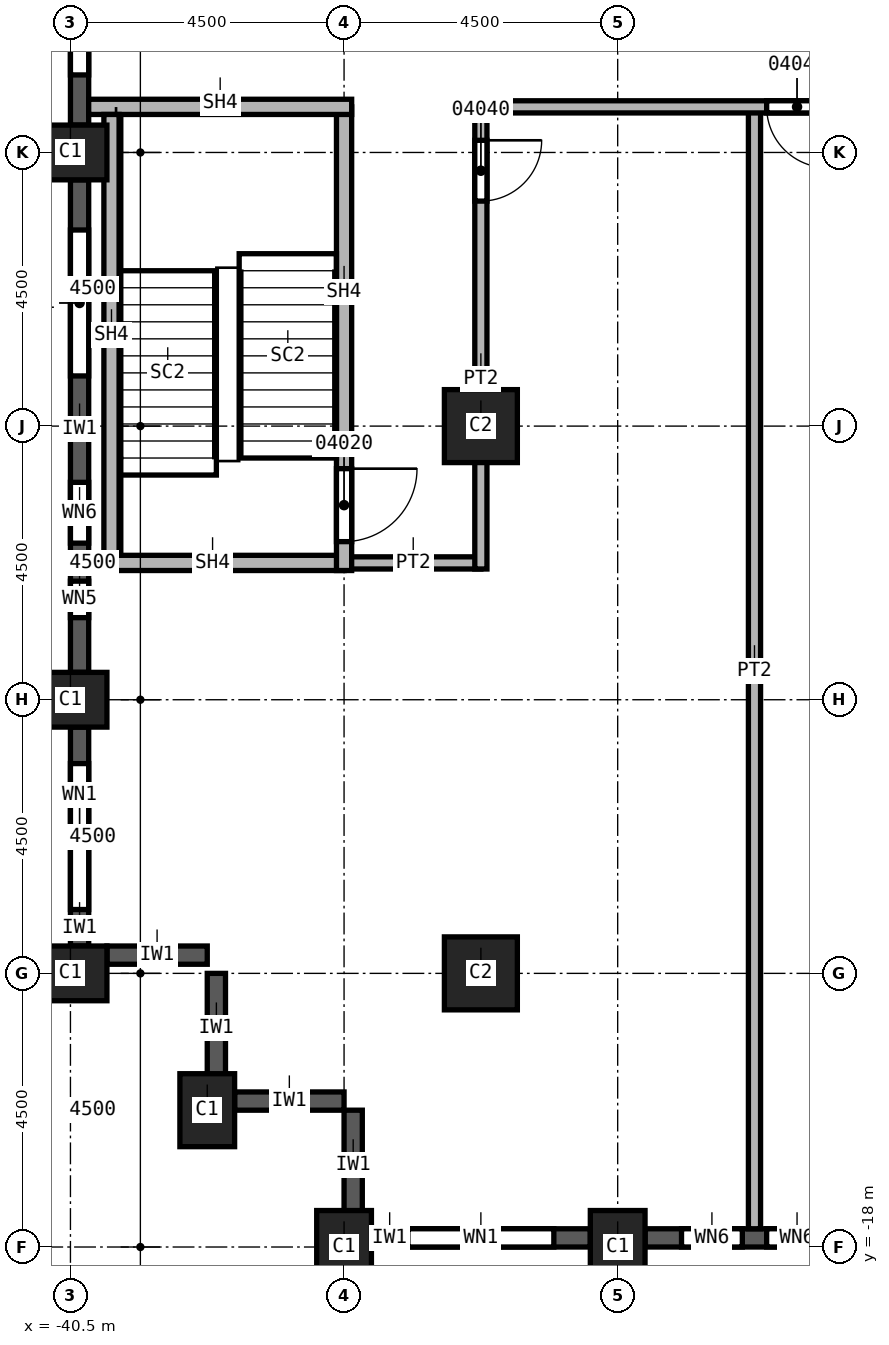
"""IFC4 building model, lengths in metres.
Left out: names, types, materials, properties, quantities, classifications, styles, units other than length and angle.
Written with IfcOpenShell. Run it as: python <this file> out.ifc"""

import sys

from ifc_helpers import new_model, si_unit, direction, frame, frame_2d, origin, origin_2d, place, context, subcontext, project, spatial, rectangle, extrude, element, fill, save


model = new_model("IFC4")
c1 = context("Model", 3, precision=1e-05, world=origin(), true_north=direction((0.0, 1.0)))
c2 = subcontext(c1, "Body", "Model", "MODEL_VIEW")
j1 = project(units=[si_unit("LENGTHUNIT", "METRE"), si_unit("PLANEANGLEUNIT", "RADIAN")], contexts=[c1])
p1 = place(None, origin())
s1 = spatial("IfcSite", under=j1, at=p1, CompositionType="ELEMENT")
p2 = place(p1, origin())
s2 = spatial("IfcBuilding", under=s1, at=p2, CompositionType="ELEMENT")
p3 = place(p2, frame((0.0, 0.0, 104.0)))
s3 = spatial("IfcBuildingStorey", under=s2, at=p3, CompositionType="ELEMENT", Elevation=104.0)
for number, where, z_axis, x_axis in (
    (1, (-40.5, 0.0, 0.0), (0.0, 0.0, 1.0), (0.0, 1.0, 0.0)),
    (2, (-40.5, -9.0, 0.0), (0.0, 0.0, 1.0), (0.0, 1.0, 0.0)),
    (3, (-40.5, -13.5, 0.0), (0.0, 0.0, 1.0), (0.0, 1.0, 0.0)),
    (4, (-38.25, -15.75, 0.0), (0.0, 0.0, 1.0), (1.0, 0.0, 0.0)),
    (5, (-31.5, -18.0, 0.0), (0.0, 0.0, 1.0), (1.0, 0.0, 0.0)),
    (6, (-36.0, -18.0, 0.0), (0.0, 0.0, 1.0), (1.0, 0.0, 0.0)),
):
    element("IfcColumn", number, at=place(p3, frame(where, z_axis=z_axis, x_axis=x_axis)), inside=s3, PredefinedType="COLUMN", context=c2, shape_type="SweptSolid", body=[
        extrude(rectangle(XDim=0.9, YDim=1.2, at=origin_2d()), origin(), (0.0, 0.0, 1.0), 3.7),
    ])
for number, where, z_axis, x_axis in (
    (7, (-33.75, -4.5, 0.0), (0.0, 0.0, 1.0), (1.0, 0.0, 0.0)),
    (8, (-33.75, -13.5, 0.0), (0.0, 0.0, 1.0), (1.0, 0.0, 0.0)),
):
    element("IfcColumn", number, at=place(p3, frame(where, z_axis=z_axis, x_axis=x_axis)), inside=s3, PredefinedType="COLUMN", context=c2, shape_type="SweptSolid", body=[
        extrude(rectangle(XDim=1.2, YDim=1.2, at=origin_2d()), origin(), (0.0, 0.0, 1.0), 3.7),
    ])
p4 = place(p3, frame((-39.9, -13.2, 0.0), z_axis=(0.0, 0.0, 1.0), x_axis=(1.0, 0.0, 0.0)))
e9 = element("IfcWall", 9, at=p4, inside=s3, PredefinedType="SOLIDWALL", context=c2, shape_type="SweptSolid", body=[
    extrude(rectangle(XDim=1.65, YDim=0.3, at=frame_2d((0.825, 0.0))), origin(), (0.0, 0.0, 1.0), 3.1),
])
for number, where, z_axis, x_axis in (
    (10, (-38.1, -15.3, 0.0), (0.0, 0.0, 1.0), (0.0, 1.0, 0.0)),
    (11, (-37.8, -15.6, 0.0), (0.0, 0.0, 1.0), (1.0, 0.0, 0.0)),
    (12, (-35.85, -17.55, 0.0), (0.0, 0.0, 1.0), (0.0, 1.0, 0.0)),
):
    element("IfcWall", number, at=place(p3, frame(where, z_axis=z_axis, x_axis=x_axis)), inside=s3, PredefinedType="SOLIDWALL", context=c2, shape_type="SweptSolid", body=[
        extrude(rectangle(XDim=1.8, YDim=0.3, at=frame_2d((0.9, 0.0))), origin(), (0.0, 0.0, 1.0), 3.1),
    ])
p5 = place(p3, frame((-40.35, 8.55, 0.0), z_axis=(0.0, 0.0, 1.0), x_axis=(0.0, -1.0, 0.0)))
e13 = element("IfcWall", 13, at=p5, inside=s3, PredefinedType="SOLIDWALL", context=c2, shape_type="SweptSolid", body=[
    extrude(rectangle(XDim=8.1, YDim=0.3, at=frame_2d((4.05, 0.0))), origin(), (0.0, 0.0, 1.0), 3.1),
])
p6 = place(p5, frame((0.825, 0.0, 0.8)))
e14 = element("IfcOpeningElement", 14, at=p6, cuts=e13, PredefinedType="OPENING", context=c2, shape_type="SweptSolid", body=[
    extrude(rectangle(XDim=2.4, YDim=1.95, at=frame_2d((1.2, 0.975))), frame((0.0, 0.15, 0.0), z_axis=(0.0, -1.0, 0.0), x_axis=(1.0, 0.0, 0.0)), (0.0, 0.0, 1.0), 0.3),
])
p7 = place(p5, frame((4.875, 0.0, 0.8)))
e15 = element("IfcOpeningElement", 15, at=p7, cuts=e13, PredefinedType="OPENING", context=c2, shape_type="SweptSolid", body=[
    extrude(rectangle(XDim=2.4, YDim=1.95, at=frame_2d((1.2, 0.975))), frame((0.0, 0.15, 0.0), z_axis=(0.0, -1.0, 0.0), x_axis=(1.0, 0.0, 0.0)), (0.0, 0.0, 1.0), 0.3),
])
p8 = place(p3, frame((-40.35, -0.45, 0.0), z_axis=(0.0, 0.0, 1.0), x_axis=(0.0, -1.0, 0.0)))
e16 = element("IfcWall", 16, at=p8, inside=s3, PredefinedType="SOLIDWALL", context=c2, shape_type="SweptSolid", body=[
    extrude(rectangle(XDim=8.1, YDim=0.3, at=frame_2d((4.05, 0.0))), origin(), (0.0, 0.0, 1.0), 3.1),
])
p9 = place(p8, frame((0.825, 0.0, 0.8)))
e17 = element("IfcOpeningElement", 17, at=p9, cuts=e16, PredefinedType="OPENING", context=c2, shape_type="SweptSolid", body=[
    extrude(rectangle(XDim=2.4, YDim=1.95, at=frame_2d((1.2, 0.975))), frame((0.0, 0.15, 0.0), z_axis=(0.0, -1.0, 0.0), x_axis=(1.0, 0.0, 0.0)), (0.0, 0.0, 1.0), 0.3),
])
p10 = place(p8, frame((4.975, 0.0, 0.8)))
e18 = element("IfcOpeningElement", 18, at=p10, cuts=e16, PredefinedType="OPENING", context=c2, shape_type="SweptSolid", body=[
    extrude(rectangle(XDim=1.0, YDim=1.95, at=frame_2d((0.5, 0.975))), frame((0.0, 0.15, 0.0), z_axis=(0.0, -1.0, 0.0), x_axis=(1.0, 0.0, 0.0)), (0.0, 0.0, 1.0), 0.3),
])
p11 = place(p8, frame((6.6, 0.0, 0.8)))
e19 = element("IfcOpeningElement", 19, at=p11, cuts=e16, PredefinedType="OPENING", context=c2, shape_type="SweptSolid", body=[
    extrude(rectangle(XDim=0.6, YDim=1.95, at=frame_2d((0.3, 0.975))), frame((0.0, 0.15, 0.0), z_axis=(0.0, -1.0, 0.0), x_axis=(1.0, 0.0, 0.0)), (0.0, 0.0, 1.0), 0.3),
])
p12 = place(p3, frame((-40.35, -9.45, 0.0), z_axis=(0.0, 0.0, 1.0), x_axis=(0.0, -1.0, 0.0)))
e20 = element("IfcWall", 20, at=p12, inside=s3, PredefinedType="SOLIDWALL", context=c2, shape_type="SweptSolid", body=[
    extrude(rectangle(XDim=3.6, YDim=0.3, at=frame_2d((1.8, 0.0))), origin(), (0.0, 0.0, 1.0), 3.1),
])
p13 = place(p12, frame((0.6, 0.0, 0.8)))
e21 = element("IfcOpeningElement", 21, at=p13, cuts=e20, PredefinedType="OPENING", context=c2, shape_type="SweptSolid", body=[
    extrude(rectangle(XDim=2.4, YDim=1.95, at=frame_2d((1.2, 0.975))), frame((0.0, 0.15, 0.0), z_axis=(0.0, -1.0, 0.0), x_axis=(1.0, 0.0, 0.0)), (0.0, 0.0, 1.0), 0.3),
])
p14 = place(p3, frame((-35.55, -17.85, 0.0), z_axis=(0.0, 0.0, 1.0), x_axis=(1.0, 0.0, 0.0)))
e22 = element("IfcWall", 22, at=p14, inside=s3, PredefinedType="SOLIDWALL", context=c2, shape_type="SweptSolid", body=[
    extrude(rectangle(XDim=3.6, YDim=0.3, at=frame_2d((1.8, 0.0))), origin(), (0.0, 0.0, 1.0), 3.1),
])
p15 = place(p14, frame((0.6, 0.0, 0.8)))
e23 = element("IfcOpeningElement", 23, at=p15, cuts=e22, PredefinedType="OPENING", context=c2, shape_type="SweptSolid", body=[
    extrude(rectangle(XDim=2.4, YDim=1.95, at=frame_2d((1.2, 0.975))), frame((0.0, 0.15, 0.0), z_axis=(0.0, -1.0, 0.0), x_axis=(1.0, 0.0, 0.0)), (0.0, 0.0, 1.0), 0.3),
])
p16 = place(p3, frame((-31.05, -17.85, 0.0), z_axis=(0.0, 0.0, 1.0), x_axis=(1.0, 0.0, 0.0)))
e24 = element("IfcWall", 24, at=p16, inside=s3, PredefinedType="SOLIDWALL", context=c2, shape_type="SweptSolid", body=[
    extrude(rectangle(XDim=3.6, YDim=0.3, at=frame_2d((1.8, 0.0))), origin(), (0.0, 0.0, 1.0), 3.1),
])
p17 = place(p16, frame((0.6, 0.0, 0.8)))
e25 = element("IfcOpeningElement", 25, at=p17, cuts=e24, PredefinedType="OPENING", context=c2, shape_type="SweptSolid", body=[
    extrude(rectangle(XDim=1.0, YDim=1.95, at=frame_2d((0.5, 0.975))), frame((0.0, 0.15, 0.0), z_axis=(0.0, -1.0, 0.0), x_axis=(1.0, 0.0, 0.0)), (0.0, 0.0, 1.0), 0.3),
])
p18 = place(p16, frame((2.0, 0.0, 0.8)))
e26 = element("IfcOpeningElement", 26, at=p18, cuts=e24, PredefinedType="OPENING", context=c2, shape_type="SweptSolid", body=[
    extrude(rectangle(XDim=1.0, YDim=1.95, at=frame_2d((0.5, 0.975))), frame((0.0, 0.15, 0.0), z_axis=(0.0, -1.0, 0.0), x_axis=(1.0, 0.0, 0.0)), (0.0, 0.0, 1.0), 0.3),
])
p19 = place(p3, frame((-33.75, -6.75, 0.0), z_axis=(0.0, 0.0, 1.0), x_axis=(-1.0, 0.0, 0.0)))
e27 = element("IfcWall", 27, at=p19, inside=s3, PredefinedType="PARTITIONING", context=c2, shape_type="SweptSolid", body=[
    extrude(rectangle(XDim=2.25, YDim=0.2, at=frame_2d((1.125, 0.0))), origin(), (0.0, 0.0, 1.0), 3.7),
])
p20 = place(p3, frame((-33.75, 0.75, 0.0), z_axis=(0.0, 0.0, 1.0), x_axis=(0.0, -1.0, 0.0)))
e28 = element("IfcWall", 28, at=p20, inside=s3, PredefinedType="PARTITIONING", context=c2, shape_type="SweptSolid", body=[
    extrude(rectangle(XDim=7.6, YDim=0.2, at=frame_2d((3.8, 0.0))), origin(), (0.0, 0.0, 1.0), 3.7),
])
p21 = place(p20, frame((0.55, 0.0, 0.0)))
e29 = element("IfcOpeningElement", 29, at=p21, cuts=e28, PredefinedType="OPENING", context=c2, shape_type="SweptSolid", body=[
    extrude(rectangle(XDim=1.0, YDim=2.1, at=frame_2d((0.5, 1.05))), frame((0.0, 0.1, 0.0), z_axis=(0.0, -1.0, 0.0), x_axis=(1.0, 0.0, 0.0)), (0.0, 0.0, 1.0), 0.2),
])
p22 = place(p3, frame((-29.25, 0.75, 0.0), z_axis=(0.0, 0.0, 1.0), x_axis=(0.0, -1.0, 0.0)))
e30 = element("IfcWall", 30, at=p22, inside=s3, PredefinedType="PARTITIONING", context=c2, shape_type="SweptSolid", body=[
    extrude(rectangle(XDim=18.45, YDim=0.2, at=frame_2d((9.225, 0.0))), origin(), (0.0, 0.0, 1.0), 3.7),
])
p23 = place(p3, frame((-15.4, 0.75, 0.0), z_axis=(0.0, 0.0, 1.0), x_axis=(-1.0, 0.0, 0.0)))
e31 = element("IfcWall", 31, at=p23, inside=s3, PredefinedType="PARTITIONING", context=c2, shape_type="SweptSolid", body=[
    extrude(rectangle(XDim=18.45, YDim=0.2, at=frame_2d((9.225, 0.0))), origin(), (0.0, 0.0, 1.0), 3.7),
])
p24 = place(p23, frame((12.65, 0.0, 0.0)))
e32 = element("IfcOpeningElement", 32, at=p24, cuts=e31, PredefinedType="OPENING", context=c2, shape_type="SweptSolid", body=[
    extrude(rectangle(XDim=1.0, YDim=2.1, at=frame_2d((0.5, 1.05))), frame((0.0, 0.1, 0.0), z_axis=(0.0, -1.0, 0.0), x_axis=(1.0, 0.0, 0.0)), (0.0, 0.0, 1.0), 0.2),
])
p25 = place(p3, frame((-36.0, -6.75, 0.0), z_axis=(0.0, 0.0, 1.0), x_axis=(-1.0, 0.0, 0.0)))
e33 = element("IfcWall", 33, at=p25, inside=s3, PredefinedType="SOLIDWALL", context=c2, shape_type="SweptSolid", body=[
    extrude(rectangle(XDim=4.2, YDim=0.25, at=frame_2d((2.1, 0.0))), origin(), (0.0, 0.0, 1.0), 3.7),
])
p26 = place(p3, frame((-36.0, 0.75, 0.0), z_axis=(0.0, 0.0, 1.0), x_axis=(0.0, -1.0, 0.0)))
e34 = element("IfcWall", 34, at=p26, inside=s3, PredefinedType="SOLIDWALL", context=c2, shape_type="SweptSolid", body=[
    extrude(rectangle(XDim=7.625, YDim=0.25, at=frame_2d((3.812, 0.0))), origin(), (0.0, 0.0, 1.0), 3.7),
])
p27 = place(p26, frame((5.95, 0.0, 0.0)))
e35 = element("IfcOpeningElement", 35, at=p27, cuts=e34, PredefinedType="OPENING", context=c2, shape_type="SweptSolid", body=[
    extrude(rectangle(XDim=1.2, YDim=2.1, at=frame_2d((0.6, 1.05))), frame((0.0, 0.125, 0.0), z_axis=(0.0, -1.0, 0.0), x_axis=(1.0, 0.0, 0.0)), (0.0, 0.0, 1.0), 0.25),
])
p28 = place(p3, frame((-35.875, 0.75, 0.0), z_axis=(0.0, 0.0, 1.0), x_axis=(-1.0, 0.0, 0.0)))
e36 = element("IfcWall", 36, at=p28, inside=s3, PredefinedType="SOLIDWALL", context=c2, shape_type="SweptSolid", body=[
    extrude(rectangle(XDim=4.325, YDim=0.25, at=frame_2d((2.163, 0.0))), origin(), (0.0, 0.0, 1.0), 3.7),
])
p29 = place(p3, frame((-39.825, -6.625, 0.0), z_axis=(0.0, 0.0, 1.0), x_axis=(0.0, 1.0, 0.0)))
e37 = element("IfcWall", 37, at=p29, inside=s3, PredefinedType="SOLIDWALL", context=c2, shape_type="SweptSolid", body=[
    extrude(rectangle(XDim=7.25, YDim=0.25, at=frame_2d((3.625, 0.0))), origin(), (0.0, 0.0, 1.0), 3.7),
])
p30 = place(p7, origin())
e38 = element("IfcWindow", 38, at=p30, inside=s3, PartitioningType="SINGLE_PANEL", PredefinedType="WINDOW", context=c2, shape_type="SweptSolid", body=[
    extrude(rectangle(XDim=2.4, YDim=1.95, at=frame_2d((1.2, 0.975))), frame((0.0, 0.03, 0.0), z_axis=(0.0, -1.0, 0.0), x_axis=(1.0, 0.0, 0.0)), (0.0, 0.0, 1.0), 0.06),
])
fill(e15, e38)
p31 = place(p9, origin())
e39 = element("IfcWindow", 39, at=p31, inside=s3, PartitioningType="SINGLE_PANEL", PredefinedType="WINDOW", context=c2, shape_type="SweptSolid", body=[
    extrude(rectangle(XDim=2.4, YDim=1.95, at=frame_2d((1.2, 0.975))), frame((0.0, 0.03, 0.0), z_axis=(0.0, -1.0, 0.0), x_axis=(1.0, 0.0, 0.0)), (0.0, 0.0, 1.0), 0.06),
])
fill(e17, e39)
p32 = place(p13, origin())
e40 = element("IfcWindow", 40, at=p32, inside=s3, PartitioningType="SINGLE_PANEL", PredefinedType="WINDOW", context=c2, shape_type="SweptSolid", body=[
    extrude(rectangle(XDim=2.4, YDim=1.95, at=frame_2d((1.2, 0.975))), frame((0.0, 0.03, 0.0), z_axis=(0.0, -1.0, 0.0), x_axis=(1.0, 0.0, 0.0)), (0.0, 0.0, 1.0), 0.06),
])
fill(e21, e40)
p33 = place(p15, origin())
e41 = element("IfcWindow", 41, at=p33, inside=s3, PartitioningType="SINGLE_PANEL", PredefinedType="WINDOW", context=c2, shape_type="SweptSolid", body=[
    extrude(rectangle(XDim=2.4, YDim=1.95, at=frame_2d((1.2, 0.975))), frame((0.0, 0.03, 0.0), z_axis=(0.0, -1.0, 0.0), x_axis=(1.0, 0.0, 0.0)), (0.0, 0.0, 1.0), 0.06),
])
fill(e23, e41)
p34 = place(p27, origin())
e42 = element("IfcDoor", 42, at=p34, inside=s3, OperationType="SINGLE_SWING_LEFT", PredefinedType="DOOR", context=c2, shape_type="SweptSolid", body=[
    extrude(rectangle(XDim=1.2, YDim=2.1, at=frame_2d((0.6, 1.05))), frame((0.0, 0.025, 0.0), z_axis=(0.0, -1.0, 0.0), x_axis=(1.0, 0.0, 0.0)), (0.0, 0.0, 1.0), 0.05),
])
fill(e35, e42)
p35 = place(p21, origin())
e43 = element("IfcDoor", 43, at=p35, inside=s3, OperationType="SINGLE_SWING_LEFT", PredefinedType="DOOR", context=c2, shape_type="SweptSolid", body=[
    extrude(rectangle(XDim=1.0, YDim=2.1, at=frame_2d((0.5, 1.05))), frame((0.0, 0.025, 0.0), z_axis=(0.0, -1.0, 0.0), x_axis=(1.0, 0.0, 0.0)), (0.0, 0.0, 1.0), 0.05),
])
fill(e29, e43)
p36 = place(p24, origin())
e44 = element("IfcDoor", 44, at=p36, inside=s3, OperationType="SINGLE_SWING_RIGHT", PredefinedType="DOOR", context=c2, shape_type="SweptSolid", body=[
    extrude(rectangle(XDim=1.0, YDim=2.1, at=frame_2d((0.5, 1.05))), frame((0.0, 0.025, 0.0), z_axis=(0.0, -1.0, 0.0), x_axis=(1.0, 0.0, 0.0)), (0.0, 0.0, 1.0), 0.05),
])
fill(e32, e44)
p37 = place(p10, origin())
e45 = element("IfcWindow", 45, at=p37, inside=s3, PartitioningType="SINGLE_PANEL", PredefinedType="WINDOW", context=c2, shape_type="SweptSolid", body=[
    extrude(rectangle(XDim=1.0, YDim=1.95, at=frame_2d((0.5, 0.975))), frame((0.0, 0.03, 0.0), z_axis=(0.0, -1.0, 0.0), x_axis=(1.0, 0.0, 0.0)), (0.0, 0.0, 1.0), 0.06),
])
fill(e18, e45)
p38 = place(p11, origin())
e46 = element("IfcWindow", 46, at=p38, inside=s3, PartitioningType="SINGLE_PANEL", PredefinedType="WINDOW", context=c2, shape_type="SweptSolid", body=[
    extrude(rectangle(XDim=0.6, YDim=1.95, at=frame_2d((0.3, 0.975))), frame((0.0, 0.03, 0.0), z_axis=(0.0, -1.0, 0.0), x_axis=(1.0, 0.0, 0.0)), (0.0, 0.0, 1.0), 0.06),
])
fill(e19, e46)
p39 = place(p17, origin())
e47 = element("IfcWindow", 47, at=p39, inside=s3, PartitioningType="SINGLE_PANEL", PredefinedType="WINDOW", context=c2, shape_type="SweptSolid", body=[
    extrude(rectangle(XDim=1.0, YDim=1.95, at=frame_2d((0.5, 0.975))), frame((0.0, 0.03, 0.0), z_axis=(0.0, -1.0, 0.0), x_axis=(1.0, 0.0, 0.0)), (0.0, 0.0, 1.0), 0.06),
])
fill(e25, e47)
p40 = place(p18, origin())
e48 = element("IfcWindow", 48, at=p40, inside=s3, PartitioningType="SINGLE_PANEL", PredefinedType="WINDOW", context=c2, shape_type="SweptSolid", body=[
    extrude(rectangle(XDim=1.0, YDim=1.95, at=frame_2d((0.5, 0.975))), frame((0.0, 0.03, 0.0), z_axis=(0.0, -1.0, 0.0), x_axis=(1.0, 0.0, 0.0)), (0.0, 0.0, 1.0), 0.06),
])
fill(e26, e48)
save(model, sys.argv[1])
